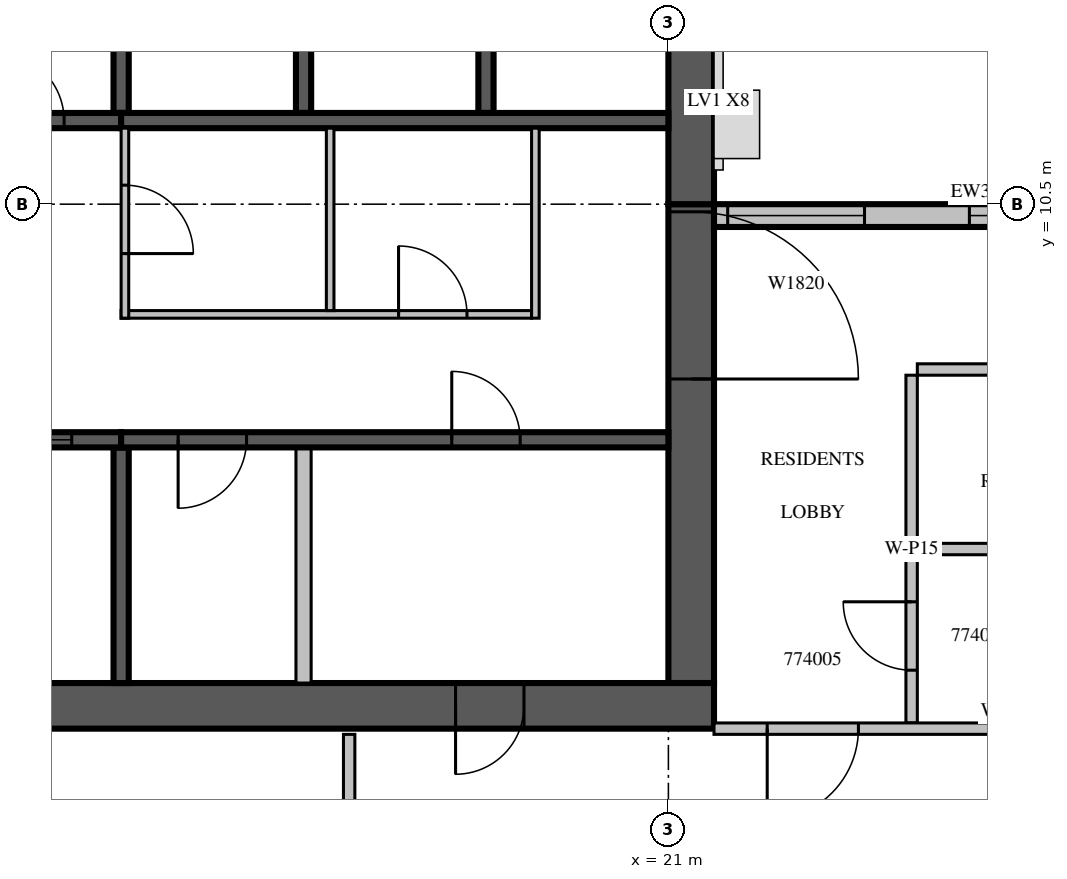
"""IFC4 building model, lengths in metres.
Left out: names, types, materials, properties, quantities, classifications, styles, units other than length and angle.
Written with IfcOpenShell. Run it as: python <this file> out.ifc"""

import sys

from ifc_helpers import new_model, si_unit, direction, frame, frame_2d, origin, place, context, subcontext, project, spatial, rectangle, extrude, source, transform, mapped, element, fill, save


model = new_model("IFC4")
c1 = context("Model", 3, precision=1e-05, world=origin(), true_north=direction((0.0, 1.0)))
c2 = subcontext(c1, "Body", "Model", "MODEL_VIEW")
j1 = project(units=[si_unit("LENGTHUNIT", "METRE"), si_unit("PLANEANGLEUNIT", "RADIAN")], contexts=[c1])
p1 = place(None, origin())
s1 = spatial("IfcSite", under=j1, at=p1, CompositionType="ELEMENT")
p2 = place(p1, origin())
s2 = spatial("IfcBuilding", under=s1, at=p2, CompositionType="ELEMENT")
p3 = place(p2, frame((0.0, 0.0, 319.5)))
s3 = spatial("IfcBuildingStorey", under=s2, at=p3, CompositionType="ELEMENT", Elevation=319.5)
m1 = source(origin(), c2, "Body", "SweptSolid", [
    extrude(rectangle(XDim=6.3, YDim=0.6, at=frame_2d((3.15, 0.0))), origin(), (0.0, 0.0, 1.0), 3.5),
])
p4 = place(p3, frame((21.3, 4.2, 0.0), z_axis=(0.0, 0.0, 1.0), x_axis=(0.0, 1.0, 0.0)))
e1 = element("IfcWall", 1, at=p4, inside=s3, PredefinedType="SHEAR", context=c2, shape_type="MappedRepresentation", body=[
    mapped(m1, transform((0.0, 0.0, 0.0), scale=1.0)),
])
m2 = source(origin(), c2, "Body", "SweptSolid", [
    extrude(rectangle(XDim=2.2, YDim=2.1, at=frame_2d((1.1, 1.05))), frame((0.0, 0.31, 0.0), z_axis=(0.0, -1.0, 0.0), x_axis=(1.0, 0.0, 0.0)), (0.0, 0.0, 1.0), 0.62),
])
p5 = place(p4, frame((4.0, 0.0, 0.0)))
e2 = element("IfcOpeningElement", 2, at=p5, cuts=e1, PredefinedType="OPENING", context=c2, shape_type="MappedRepresentation", body=[
    mapped(m2, transform((0.0, 0.0, 0.0), scale=1.0)),
])
m3 = source(origin(), c2, "Body", "SweptSolid", [
    extrude(rectangle(XDim=17.4, YDim=0.6, at=frame_2d((8.7, 0.0))), origin(), (0.0, 0.0, 1.0), 3.5),
])
p6 = place(p3, frame((4.2, 3.9, 0.0), z_axis=(0.0, 0.0, 1.0), x_axis=(1.0, 0.0, 0.0)))
e3 = element("IfcWall", 3, at=p6, inside=s3, PredefinedType="SHEAR", context=c2, shape_type="MappedRepresentation", body=[
    mapped(m3, transform((0.0, 0.0, 0.0), scale=1.0)),
])
m4 = source(origin(), c2, "Body", "SweptSolid", [
    extrude(rectangle(XDim=0.9, YDim=2.1, at=frame_2d((0.45, 1.05))), frame((0.0, 0.31, 0.0), z_axis=(0.0, -1.0, 0.0), x_axis=(1.0, 0.0, 0.0)), (0.0, 0.0, 1.0), 0.62),
])
p7 = place(p6, frame((14.0, 0.0, 0.0)))
e4 = element("IfcOpeningElement", 4, at=p7, cuts=e3, PredefinedType="OPENING", context=c2, shape_type="MappedRepresentation", body=[
    mapped(m4, transform((0.0, 0.0, 0.0), scale=1.0)),
])
m5 = source(origin(), c2, "Body", "SweptSolid", [
    extrude(rectangle(XDim=10.5, YDim=0.6, at=frame_2d((5.25, 0.0))), origin(), (0.0, 0.0, 1.0), 3.5),
])
p8 = place(p3, frame((21.3, 10.5, 0.0), z_axis=(0.0, 0.0, 1.0), x_axis=(0.0, 1.0, 0.0)))
e5 = element("IfcWall", 5, at=p8, inside=s3, PredefinedType="SHEAR", context=c2, shape_type="MappedRepresentation", body=[
    mapped(m5, transform((0.0, 0.0, 0.0), scale=1.0)),
])
m6 = source(origin(), c2, "Body", "SweptSolid", [
    extrude(rectangle(XDim=1.2, YDim=2.4, at=frame_2d((0.6, 1.2))), frame((0.0, 0.31, 0.0), z_axis=(0.0, -1.0, 0.0), x_axis=(1.0, 0.0, 0.0)), (0.0, 0.0, 1.0), 0.62),
])
p9 = place(p8, frame((5.7, 0.0, 0.6)))
e6 = element("IfcOpeningElement", 6, at=p9, cuts=e5, PredefinedType="OPENING", context=c2, shape_type="MappedRepresentation", body=[
    mapped(m6, transform((0.0, 0.0, 0.0), scale=1.0)),
])
m7 = source(origin(), c2, "Body", "SweptSolid", [
    extrude(rectangle(XDim=7.45, YDim=0.3, at=frame_2d((3.725, 0.0))), origin(), (0.0, 0.0, 1.0), 3.1),
])
p10 = place(p3, frame((29.05, 10.35, 0.0), z_axis=(0.0, 0.0, 1.0), x_axis=(-1.0, 0.0, 0.0)))
e7 = element("IfcWall", 7, at=p10, inside=s3, PredefinedType="STANDARD", context=c2, shape_type="MappedRepresentation", body=[
    mapped(m7, transform((0.0, 0.0, 0.0), scale=1.0)),
])
m8 = source(origin(), c2, "Body", "SweptSolid", [
    extrude(rectangle(XDim=3.0, YDim=2.0, at=frame_2d((1.5, 1.0))), frame((0.0, 0.16, 0.0), z_axis=(0.0, -1.0, 0.0), x_axis=(1.0, 0.0, 0.0)), (0.0, 0.0, 1.0), 0.32),
])
p11 = place(p10, frame((1.09, 0.0, 0.6)))
e8 = element("IfcOpeningElement", 8, at=p11, cuts=e7, PredefinedType="OPENING", context=c2, shape_type="MappedRepresentation", body=[
    mapped(m8, transform((0.0, 0.0, 0.0), scale=1.0)),
])
m9 = source(origin(), c2, "Body", "SweptSolid", [
    extrude(rectangle(XDim=1.8, YDim=2.0, at=frame_2d((0.9, 1.0))), frame((0.0, 0.16, 0.0), z_axis=(0.0, -1.0, 0.0), x_axis=(1.0, 0.0, 0.0)), (0.0, 0.0, 1.0), 0.32),
])
p12 = place(p10, frame((5.47, 0.0, 0.6)))
e9 = element("IfcOpeningElement", 9, at=p12, cuts=e7, PredefinedType="OPENING", context=c2, shape_type="MappedRepresentation", body=[
    mapped(m9, transform((0.0, 0.0, 0.0), scale=1.0)),
])
m10 = source(origin(), c2, "Body", "SweptSolid", [
    extrude(rectangle(XDim=3.1, YDim=0.2, at=frame_2d((1.55, 0.0))), origin(), (0.0, 0.0, 1.0), 3.1),
])
p13 = place(p3, frame((13.8, 4.2, 0.0), z_axis=(0.0, 0.0, 1.0), x_axis=(0.0, 1.0, 0.0)))
e10 = element("IfcWall", 10, at=p13, inside=s3, PredefinedType="SOLIDWALL", context=c2, shape_type="MappedRepresentation", body=[
    mapped(m10, transform((0.0, 0.0, 0.0), scale=1.0)),
])
m11 = source(origin(), c2, "Body", "SweptSolid", [
    extrude(rectangle(XDim=3.1, YDim=0.2, at=frame_2d((1.55, 0.0))), origin(), (0.0, 0.0, 1.0), 3.1),
])
p14 = place(p3, frame((16.2, 4.2, 0.0), z_axis=(0.0, 0.0, 1.0), x_axis=(0.0, 1.0, 0.0)))
e11 = element("IfcWall", 11, at=p14, inside=s3, PredefinedType="PARTITIONING", context=c2, shape_type="MappedRepresentation", body=[
    mapped(m11, transform((0.0, 0.0, 0.0), scale=1.0)),
])
m12 = source(origin(), c2, "Body", "SweptSolid", [
    extrude(rectangle(XDim=3.0, YDim=0.2, at=frame_2d((1.5, 0.0))), origin(), (0.0, 0.0, 1.0), 3.1),
])
p15 = place(p3, frame((13.8, 11.7, 0.0), z_axis=(0.0, 0.0, 1.0), x_axis=(0.0, 1.0, 0.0)))
e12 = element("IfcWall", 12, at=p15, inside=s3, PredefinedType="SOLIDWALL", context=c2, shape_type="MappedRepresentation", body=[
    mapped(m12, transform((0.0, 0.0, 0.0), scale=1.0)),
])
m13 = source(origin(), c2, "Body", "SweptSolid", [
    extrude(rectangle(XDim=3.0, YDim=0.2, at=frame_2d((1.5, 0.0))), origin(), (0.0, 0.0, 1.0), 3.5),
])
for number, where, z_axis, x_axis in (
    (13, (16.2, 11.7, 0.0), (0.0, 0.0, 1.0), (0.0, 1.0, 0.0)),
    (14, (18.6, 11.7, 0.0), (0.0, 0.0, 1.0), (0.0, 1.0, 0.0)),
):
    element("IfcWall", number, at=place(p3, frame(where, z_axis=z_axis, x_axis=x_axis)), inside=s3, PredefinedType="SOLIDWALL", context=c2, shape_type="MappedRepresentation", body=[
        mapped(m13, transform((0.0, 0.0, 0.0), scale=1.0)),
    ])
m14 = source(origin(), c2, "Body", "SweptSolid", [
    extrude(rectangle(XDim=9.6, YDim=0.2, at=frame_2d((4.8, 0.0))), origin(), (0.0, 0.0, 1.0), 3.5),
])
p16 = place(p3, frame((4.2, 7.4, 0.0), z_axis=(0.0, 0.0, 1.0), x_axis=(1.0, 0.0, 0.0)))
e15 = element("IfcWall", 15, at=p16, inside=s3, PredefinedType="SOLIDWALL", context=c2, shape_type="MappedRepresentation", body=[
    mapped(m14, transform((0.0, 0.0, 0.0), scale=1.0)),
])
m15 = source(origin(), c2, "Body", "SweptSolid", [
    extrude(rectangle(XDim=1.1, YDim=2.1, at=frame_2d((0.55, 1.05))), frame((0.0, 0.11, 0.0), z_axis=(0.0, -1.0, 0.0), x_axis=(1.0, 0.0, 0.0)), (0.0, 0.0, 1.0), 0.22),
])
p17 = place(p16, frame((0.65, 0.0, 0.0)))
e16 = element("IfcOpeningElement", 16, at=p17, cuts=e15, PredefinedType="OPENING", context=c2, shape_type="MappedRepresentation", body=[
    mapped(m15, transform((0.0, 0.0, 0.0), scale=1.0)),
])
p18 = place(p16, frame((3.05, 0.0, 0.0)))
e17 = element("IfcOpeningElement", 17, at=p18, cuts=e15, PredefinedType="OPENING", context=c2, shape_type="MappedRepresentation", body=[
    mapped(m15, transform((0.0, 0.0, 0.0), scale=1.0)),
])
p19 = place(p16, frame((5.45, 0.0, 0.0)))
e18 = element("IfcOpeningElement", 18, at=p19, cuts=e15, PredefinedType="OPENING", context=c2, shape_type="MappedRepresentation", body=[
    mapped(m15, transform((0.0, 0.0, 0.0), scale=1.0)),
])
p20 = place(p16, frame((7.85, 0.0, 0.0)))
e19 = element("IfcOpeningElement", 19, at=p20, cuts=e15, PredefinedType="OPENING", context=c2, shape_type="MappedRepresentation", body=[
    mapped(m15, transform((0.0, 0.0, 0.0), scale=1.0)),
])
m16 = source(origin(), c2, "Body", "SweptSolid", [
    extrude(rectangle(XDim=7.2, YDim=0.2, at=frame_2d((3.6, 0.0))), origin(), (0.0, 0.0, 1.0), 3.1),
])
p21 = place(p3, frame((13.8, 7.4, 0.0), z_axis=(0.0, 0.0, 1.0), x_axis=(1.0, 0.0, 0.0)))
e20 = element("IfcWall", 20, at=p21, inside=s3, PredefinedType="SOLIDWALL", context=c2, shape_type="MappedRepresentation", body=[
    mapped(m16, transform((0.0, 0.0, 0.0), scale=1.0)),
])
m17 = source(origin(), c2, "Body", "SweptSolid", [
    extrude(rectangle(XDim=0.9, YDim=2.1, at=frame_2d((0.45, 1.05))), frame((0.0, 0.11, 0.0), z_axis=(0.0, -1.0, 0.0), x_axis=(1.0, 0.0, 0.0)), (0.0, 0.0, 1.0), 0.22),
])
p22 = place(p21, frame((0.75, 0.0, 0.0)))
e21 = element("IfcOpeningElement", 21, at=p22, cuts=e20, PredefinedType="OPENING", context=c2, shape_type="MappedRepresentation", body=[
    mapped(m17, transform((0.0, 0.0, 0.0), scale=1.0)),
])
p23 = place(p21, frame((4.35, 0.0, 0.0)))
e22 = element("IfcOpeningElement", 22, at=p23, cuts=e20, PredefinedType="OPENING", context=c2, shape_type="MappedRepresentation", body=[
    mapped(m17, transform((0.0, 0.0, 0.0), scale=1.0)),
])
m18 = source(origin(), c2, "Body", "SweptSolid", [
    extrude(rectangle(XDim=4.8, YDim=0.2, at=frame_2d((2.4, 0.0))), origin(), (0.0, 0.0, 1.0), 3.1),
])
p24 = place(p3, frame((9.0, 11.6, 0.0), z_axis=(0.0, 0.0, 1.0), x_axis=(1.0, 0.0, 0.0)))
e23 = element("IfcWall", 23, at=p24, inside=s3, PredefinedType="SOLIDWALL", context=c2, shape_type="MappedRepresentation", body=[
    mapped(m18, transform((0.0, 0.0, 0.0), scale=1.0)),
])
p25 = place(p24, frame((0.75, 0.0, 0.0)))
e24 = element("IfcOpeningElement", 24, at=p25, cuts=e23, PredefinedType="OPENING", context=c2, shape_type="MappedRepresentation", body=[
    mapped(m17, transform((0.0, 0.0, 0.0), scale=1.0)),
])
p26 = place(p24, frame((3.15, 0.0, 0.0)))
e25 = element("IfcOpeningElement", 25, at=p26, cuts=e23, PredefinedType="OPENING", context=c2, shape_type="MappedRepresentation", body=[
    mapped(m17, transform((0.0, 0.0, 0.0), scale=1.0)),
])
m19 = source(origin(), c2, "Body", "SweptSolid", [
    extrude(rectangle(XDim=7.2, YDim=0.2, at=frame_2d((3.6, 0.0))), origin(), (0.0, 0.0, 1.0), 3.5),
])
p27 = place(p3, frame((13.8, 11.6, 0.0), z_axis=(0.0, 0.0, 1.0), x_axis=(1.0, 0.0, 0.0)))
e26 = element("IfcWall", 26, at=p27, inside=s3, PredefinedType="SOLIDWALL", context=c2, shape_type="MappedRepresentation", body=[
    mapped(m19, transform((0.0, 0.0, 0.0), scale=1.0)),
])
m20 = source(origin(), c2, "Body", "SweptSolid", [
    extrude(rectangle(XDim=5.4, YDim=0.1, at=frame_2d((2.7, 0.0))), origin(), (0.0, 0.0, 1.0), 3.1),
])
p28 = place(p3, frame((13.8, 9.05, 0.0), z_axis=(0.0, 0.0, 1.0), x_axis=(1.0, 0.0, 0.0)))
e27 = element("IfcWall", 27, at=p28, inside=s3, PredefinedType="PARTITIONING", context=c2, shape_type="MappedRepresentation", body=[
    mapped(m20, transform((0.0, 0.0, 0.0), scale=1.0)),
])
m21 = source(origin(), c2, "Body", "SweptSolid", [
    extrude(rectangle(XDim=0.9, YDim=2.1, at=frame_2d((0.45, 1.05))), frame((0.0, 0.06, 0.0), z_axis=(0.0, -1.0, 0.0), x_axis=(1.0, 0.0, 0.0)), (0.0, 0.0, 1.0), 0.12),
])
p29 = place(p28, frame((3.65, 0.0, 0.0)))
e28 = element("IfcOpeningElement", 28, at=p29, cuts=e27, PredefinedType="OPENING", context=c2, shape_type="MappedRepresentation", body=[
    mapped(m21, transform((0.0, 0.0, 0.0), scale=1.0)),
])
m22 = source(origin(), c2, "Body", "SweptSolid", [
    extrude(rectangle(XDim=2.5, YDim=0.1, at=frame_2d((1.25, 0.0))), origin(), (0.0, 0.0, 1.0), 3.1),
])
p30 = place(p3, frame((13.85, 9.0, 0.0), z_axis=(0.0, 0.0, 1.0), x_axis=(0.0, 1.0, 0.0)))
e29 = element("IfcWall", 29, at=p30, inside=s3, PredefinedType="PARTITIONING", context=c2, shape_type="MappedRepresentation", body=[
    mapped(m22, transform((0.0, 0.0, 0.0), scale=1.0)),
])
p31 = place(p30, frame((0.85, 0.0, 0.0)))
e30 = element("IfcOpeningElement", 30, at=p31, cuts=e29, PredefinedType="OPENING", context=c2, shape_type="MappedRepresentation", body=[
    mapped(m21, transform((0.0, 0.0, 0.0), scale=1.0)),
])
m23 = source(origin(), c2, "Body", "SweptSolid", [
    extrude(rectangle(XDim=2.4, YDim=0.1, at=frame_2d((1.2, 0.0))), origin(), (0.0, 0.0, 1.0), 3.1),
])
p32 = place(p3, frame((16.55, 9.1, 0.0), z_axis=(0.0, 0.0, 1.0), x_axis=(0.0, 1.0, 0.0)))
e31 = element("IfcWall", 31, at=p32, inside=s3, PredefinedType="PARTITIONING", context=c2, shape_type="MappedRepresentation", body=[
    mapped(m23, transform((0.0, 0.0, 0.0), scale=1.0)),
])
p33 = place(p3, frame((19.25, 9.0, 0.0), z_axis=(0.0, 0.0, 1.0), x_axis=(0.0, 1.0, 0.0)))
e32 = element("IfcWall", 32, at=p33, inside=s3, PredefinedType="PARTITIONING", context=c2, shape_type="MappedRepresentation", body=[
    mapped(m22, transform((0.0, 0.0, 0.0), scale=1.0)),
])
m24 = source(origin(), c2, "Body", "SweptSolid", [
    extrude(rectangle(XDim=4.575, YDim=0.15, at=frame_2d((2.288, 0.0))), origin(), (0.0, 0.0, 1.0), 3.1),
])
p34 = place(p3, frame((24.2, 8.25, 0.0), z_axis=(0.0, 0.0, 1.0), x_axis=(0.0, -1.0, 0.0)))
e33 = element("IfcWall", 33, at=p34, inside=s3, PredefinedType="PARTITIONING", context=c2, shape_type="MappedRepresentation", body=[
    mapped(m24, transform((0.0, 0.0, 0.0), scale=1.0)),
])
m25 = source(origin(), c2, "Body", "SweptSolid", [
    extrude(rectangle(XDim=0.9, YDim=2.1, at=frame_2d((0.45, 1.05))), frame((0.0, 0.085, 0.0), z_axis=(0.0, -1.0, 0.0), x_axis=(1.0, 0.0, 0.0)), (0.0, 0.0, 1.0), 0.17),
])
p35 = place(p34, frame((2.981, 0.0, 0.0)))
e34 = element("IfcOpeningElement", 34, at=p35, cuts=e33, PredefinedType="OPENING", context=c2, shape_type="MappedRepresentation", body=[
    mapped(m25, transform((0.0, 0.0, 0.0), scale=1.0)),
])
m26 = source(origin(), c2, "Body", "SweptSolid", [
    extrude(rectangle(XDim=5.05, YDim=0.15, at=frame_2d((2.525, 0.0))), origin(), (0.0, 0.0, 1.0), 3.1),
])
p36 = place(p3, frame((29.325, 8.325, 0.0), z_axis=(0.0, 0.0, 1.0), x_axis=(-1.0, 0.0, 0.0)))
e35 = element("IfcWall", 35, at=p36, inside=s3, PredefinedType="PARTITIONING", context=c2, shape_type="MappedRepresentation", body=[
    mapped(m26, transform((0.0, 0.0, 0.0), scale=1.0)),
])
m27 = source(origin(), c2, "Body", "SweptSolid", [
    extrude(rectangle(XDim=1.0, YDim=2.1, at=frame_2d((0.5, 1.05))), frame((0.0, 0.085, 0.0), z_axis=(0.0, -1.0, 0.0), x_axis=(1.0, 0.0, 0.0)), (0.0, 0.0, 1.0), 0.17),
])
p37 = place(p36, frame((2.025, 0.0, 0.0)))
e36 = element("IfcOpeningElement", 36, at=p37, cuts=e35, PredefinedType="OPENING", context=c2, shape_type="MappedRepresentation", body=[
    mapped(m27, transform((0.0, 0.0, 0.0), scale=1.0)),
])
p38 = place(p3, frame((29.325, 5.963, 0.0), z_axis=(0.0, 0.0, 1.0), x_axis=(-1.0, 0.0, 0.0)))
e37 = element("IfcWall", 37, at=p38, inside=s3, PredefinedType="PARTITIONING", context=c2, shape_type="MappedRepresentation", body=[
    mapped(m26, transform((0.0, 0.0, 0.0), scale=1.0)),
])
m28 = source(origin(), c2, "Body", "SweptSolid", [
    extrude(rectangle(XDim=3.225, YDim=0.15, at=frame_2d((1.613, 0.0))), origin(), (0.0, 0.0, 1.0), 3.1),
])
p39 = place(p3, frame((16.8, 3.525, 0.0), z_axis=(0.0, 0.0, 1.0), x_axis=(0.0, -1.0, 0.0)))
e38 = element("IfcWall", 38, at=p39, inside=s3, PredefinedType="PARTITIONING", context=c2, shape_type="MappedRepresentation", body=[
    mapped(m28, transform((0.0, 0.0, 0.0), scale=1.0)),
])
p40 = place(p39, frame((1.125, 0.0, 0.0)))
e39 = element("IfcOpeningElement", 39, at=p40, cuts=e38, PredefinedType="OPENING", context=c2, shape_type="MappedRepresentation", body=[
    mapped(m25, transform((0.0, 0.0, 0.0), scale=1.0)),
])
m29 = source(origin(), c2, "Body", "SweptSolid", [
    extrude(rectangle(XDim=7.725, YDim=0.15, at=frame_2d((3.862, 0.0))), origin(), (0.0, 0.0, 1.0), 3.1),
])
p41 = place(p3, frame((21.6, 3.6, 0.0), z_axis=(0.0, 0.0, 1.0), x_axis=(1.0, 0.0, 0.0)))
e40 = element("IfcWall", 40, at=p41, inside=s3, PredefinedType="PARTITIONING", context=c2, shape_type="MappedRepresentation", body=[
    mapped(m29, transform((0.0, 0.0, 0.0), scale=1.0)),
])
m30 = source(origin(), c2, "Body", "SweptSolid", [
    extrude(rectangle(XDim=1.2, YDim=2.1, at=frame_2d((0.6, 1.05))), frame((0.0, 0.085, 0.0), z_axis=(0.0, -1.0, 0.0), x_axis=(1.0, 0.0, 0.0)), (0.0, 0.0, 1.0), 0.17),
])
p42 = place(p41, frame((0.7, 0.0, 0.0)))
e41 = element("IfcOpeningElement", 41, at=p42, cuts=e40, PredefinedType="OPENING", context=c2, shape_type="MappedRepresentation", body=[
    mapped(m30, transform((0.0, 0.0, 0.0), scale=1.0)),
])
m31 = source(origin(), c2, "Body", "SweptSolid", [
    extrude(rectangle(XDim=3.0, YDim=2.0, at=frame_2d((1.5, 1.0))), frame((0.0, 0.03, 0.0), z_axis=(0.0, -1.0, 0.0), x_axis=(1.0, 0.0, 0.0)), (0.0, 0.0, 1.0), 0.06),
])
p43 = place(p11, origin())
e42 = element("IfcWindow", 42, at=p43, inside=s3, PartitioningType="SINGLE_PANEL", PredefinedType="WINDOW", context=c2, shape_type="MappedRepresentation", body=[
    mapped(m31, transform((0.0, 0.0, 0.0), scale=1.0)),
])
fill(e8, e42)
m32 = source(origin(), c2, "Body", "SweptSolid", [
    extrude(rectangle(XDim=1.8, YDim=2.0, at=frame_2d((0.9, 1.0))), frame((0.0, 0.03, 0.0), z_axis=(0.0, -1.0, 0.0), x_axis=(1.0, 0.0, 0.0)), (0.0, 0.0, 1.0), 0.06),
])
p44 = place(p12, origin())
e43 = element("IfcWindow", 43, at=p44, inside=s3, PartitioningType="SINGLE_PANEL", PredefinedType="WINDOW", context=c2, shape_type="MappedRepresentation", body=[
    mapped(m32, transform((0.0, 0.0, 0.0), scale=1.0)),
])
fill(e9, e43)
m33 = source(origin(), c2, "Body", "SweptSolid", [
    extrude(rectangle(XDim=1.1, YDim=2.1, at=frame_2d((0.55, 1.05))), frame((0.0, 0.025, 0.0), z_axis=(0.0, -1.0, 0.0), x_axis=(1.0, 0.0, 0.0)), (0.0, 0.0, 1.0), 0.05),
])
p45 = place(p20, origin())
e44 = element("IfcDoor", 44, at=p45, inside=s3, OperationType="SLIDING_TO_LEFT", PredefinedType="DOOR", context=c2, shape_type="MappedRepresentation", body=[
    mapped(m33, transform((0.0, 0.0, 0.0), scale=1.0)),
])
fill(e19, e44)
m34 = source(origin(), c2, "Body", "SweptSolid", [
    extrude(rectangle(XDim=0.9, YDim=2.1, at=frame_2d((0.45, 1.05))), frame((0.0, 0.025, 0.0), z_axis=(0.0, -1.0, 0.0), x_axis=(1.0, 0.0, 0.0)), (0.0, 0.0, 1.0), 0.05),
])
p46 = place(p22, origin())
e45 = element("IfcDoor", 45, at=p46, inside=s3, OperationType="SINGLE_SWING_RIGHT", PredefinedType="DOOR", context=c2, shape_type="MappedRepresentation", body=[
    mapped(m34, transform((0.0, 0.0, 0.0), scale=1.0)),
])
fill(e21, e45)
p47 = place(p23, origin())
e46 = element("IfcDoor", 46, at=p47, inside=s3, OperationType="SINGLE_SWING_LEFT", PredefinedType="DOOR", context=c2, shape_type="MappedRepresentation", body=[
    mapped(m34, transform((0.0, 0.0, 0.0), scale=1.0)),
])
fill(e22, e46)
p48 = place(p26, origin())
e47 = element("IfcDoor", 47, at=p48, inside=s3, OperationType="SINGLE_SWING_LEFT", PredefinedType="DOOR", context=c2, shape_type="MappedRepresentation", body=[
    mapped(m34, transform((0.0, 0.0, 0.0), scale=1.0)),
])
fill(e25, e47)
p49 = place(p29, origin())
e48 = element("IfcDoor", 48, at=p49, inside=s3, OperationType="SINGLE_SWING_LEFT", PredefinedType="DOOR", context=c2, shape_type="MappedRepresentation", body=[
    mapped(m34, transform((0.0, 0.0, 0.0), scale=1.0)),
])
fill(e28, e48)
p50 = place(p31, origin())
e49 = element("IfcDoor", 49, at=p50, inside=s3, OperationType="SINGLE_SWING_RIGHT", PredefinedType="DOOR", context=c2, shape_type="MappedRepresentation", body=[
    mapped(m34, transform((0.0, 0.0, 0.0), scale=1.0)),
])
fill(e30, e49)
m35 = source(origin(), c2, "Body", "SweptSolid", [
    extrude(rectangle(XDim=2.2, YDim=2.1, at=frame_2d((1.1, 1.05))), frame((0.0, 0.025, 0.0), z_axis=(0.0, -1.0, 0.0), x_axis=(1.0, 0.0, 0.0)), (0.0, 0.0, 1.0), 0.05),
])
p51 = place(p5, origin())
e50 = element("IfcDoor", 50, at=p51, inside=s3, OperationType="DOUBLE_DOOR_SINGLE_SWING", PredefinedType="DOOR", context=c2, shape_type="MappedRepresentation", body=[
    mapped(m35, transform((0.0, 0.0, 0.0), scale=1.0)),
])
fill(e2, e50)
p52 = place(p7, origin())
e51 = element("IfcDoor", 51, at=p52, inside=s3, OperationType="SINGLE_SWING_RIGHT", PredefinedType="DOOR", context=c2, shape_type="MappedRepresentation", body=[
    mapped(m34, transform((0.0, 0.0, 0.0), scale=1.0)),
])
fill(e4, e51)
p53 = place(p35, origin())
e52 = element("IfcDoor", 52, at=p53, inside=s3, OperationType="SINGLE_SWING_RIGHT", PredefinedType="DOOR", context=c2, shape_type="MappedRepresentation", body=[
    mapped(m34, transform((0.0, 0.0, 0.0), scale=1.0)),
])
fill(e34, e52)
m36 = source(origin(), c2, "Body", "SweptSolid", [
    extrude(rectangle(XDim=1.2, YDim=2.1, at=frame_2d((0.6, 1.05))), frame((0.0, 0.025, 0.0), z_axis=(0.0, -1.0, 0.0), x_axis=(1.0, 0.0, 0.0)), (0.0, 0.0, 1.0), 0.05),
])
p54 = place(p42, origin())
e53 = element("IfcDoor", 53, at=p54, inside=s3, OperationType="SINGLE_SWING_RIGHT", PredefinedType="DOOR", context=c2, shape_type="MappedRepresentation", body=[
    mapped(m36, transform((0.0, 0.0, 0.0), scale=1.0)),
])
fill(e41, e53)
save(model, sys.argv[1])
